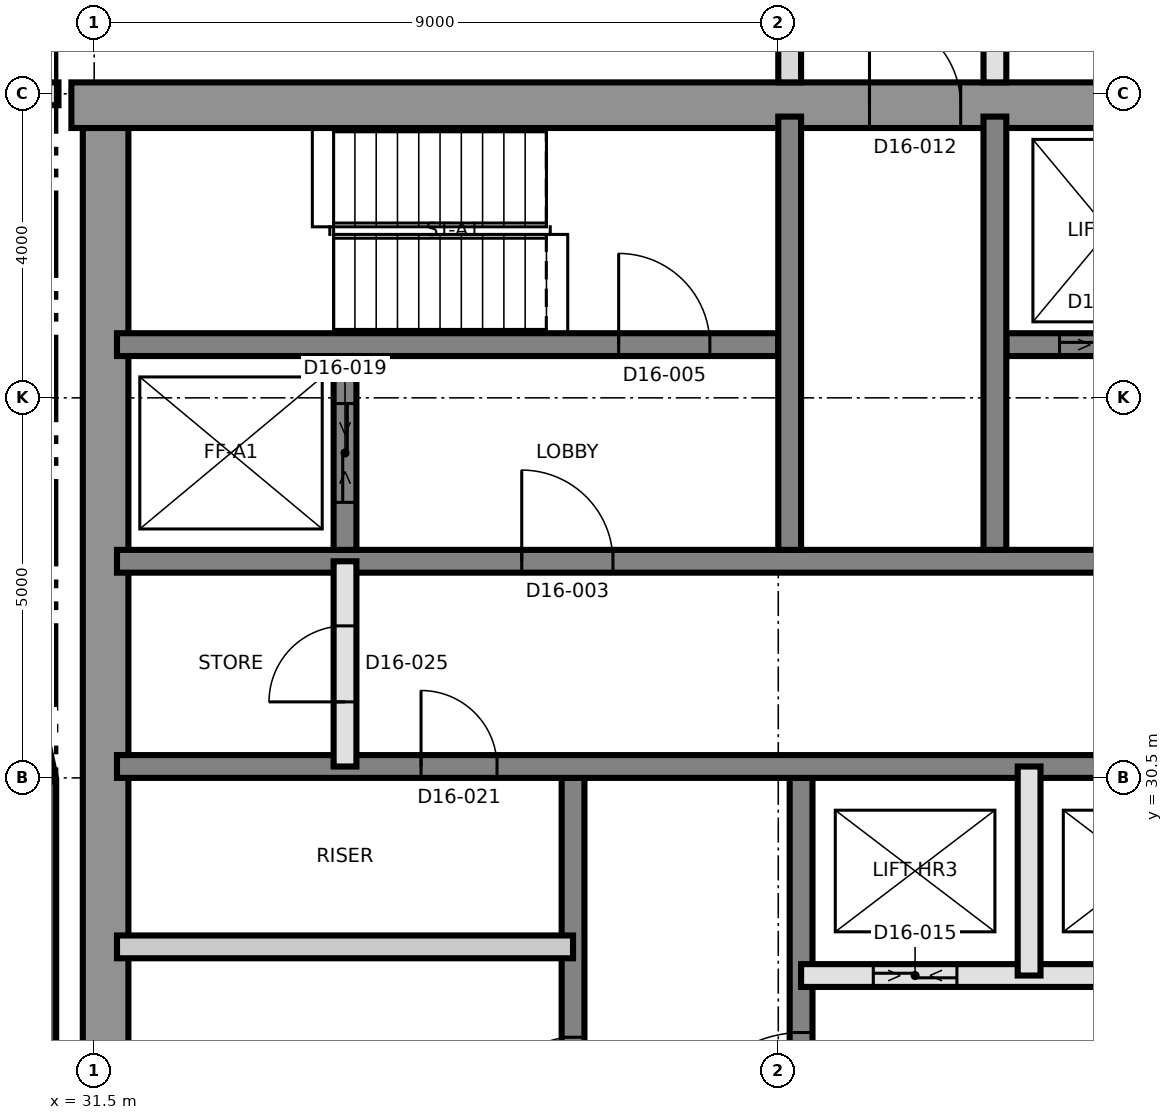
"""IFC4 building model, lengths in metres.
Left out: names, types, materials, properties, quantities, classifications, styles, units other than length and angle.
Written with IfcOpenShell. Run it as: python <this file> out.ifc"""

import sys

from ifc_helpers import new_model, si_unit, direction, frame, frame_2d, origin, place, context, subcontext, project, spatial, rectangle, extrude, element, fill, save


model = new_model("IFC4")
c1 = context("Model", 3, precision=1e-05, world=origin(), true_north=direction((0.0, 1.0)))
c2 = subcontext(c1, "Body", "Model", "MODEL_VIEW")
j1 = project(units=[si_unit("LENGTHUNIT", "METRE"), si_unit("PLANEANGLEUNIT", "RADIAN")], contexts=[c1])
p1 = place(None, origin())
s1 = spatial("IfcSite", under=j1, at=p1, CompositionType="ELEMENT")
p2 = place(p1, origin())
s2 = spatial("IfcBuilding", under=s1, at=p2, CompositionType="ELEMENT")
p3 = place(p2, frame((0.0, 0.0, 160.7)))
s3 = spatial("IfcBuildingStorey", under=s2, at=p3, CompositionType="ELEMENT", Elevation=160.7)
p4 = place(p3, frame((31.65, 21.8, 0.0), z_axis=(0.0, 0.0, 1.0), x_axis=(0.0, 1.0, 0.0)))
e1 = element("IfcWall", 1, at=p4, inside=s3, PredefinedType="SHEAR", context=c2, shape_type="SweptSolid", body=[
    extrude(rectangle(XDim=17.4, YDim=0.6, at=frame_2d((8.7, 0.0))), origin(), (0.0, 0.0, 1.0), 3.7),
])
p5 = place(p3, frame((31.2, 39.35, 0.0), z_axis=(0.0, 0.0, 1.0), x_axis=(1.0, 0.0, 0.0)))
e2 = element("IfcWall", 2, at=p5, inside=s3, PredefinedType="SHEAR", context=c2, shape_type="SweptSolid", body=[
    extrude(rectangle(XDim=27.0, YDim=0.6, at=frame_2d((13.5, 0.0))), origin(), (0.0, 0.0, 1.0), 3.7),
])
p6 = place(p5, frame((10.5, 0.0, 0.0)))
e3 = element("IfcOpeningElement", 3, at=p6, cuts=e2, PredefinedType="OPENING", context=c2, shape_type="SweptSolid", body=[
    extrude(rectangle(XDim=1.2, YDim=2.1, at=frame_2d((0.6, 1.05))), frame((0.0, 0.31, 0.0), z_axis=(0.0, -1.0, 0.0), x_axis=(1.0, 0.0, 0.0)), (0.0, 0.0, 1.0), 0.62),
])
p7 = place(p3, frame((37.8, 21.8, 0.0), z_axis=(0.0, 0.0, 1.0), x_axis=(0.0, 1.0, 0.0)))
e4 = element("IfcWall", 4, at=p7, inside=s3, PredefinedType="SHEAR", context=c2, shape_type="SweptSolid", body=[
    extrude(rectangle(XDim=8.7, YDim=0.3, at=frame_2d((4.35, 0.0))), origin(), (0.0, 0.0, 1.0), 3.7),
])
p8 = place(p7, frame((4.288, 0.0, 0.0)))
e5 = element("IfcOpeningElement", 5, at=p8, cuts=e4, PredefinedType="OPENING", context=c2, shape_type="SweptSolid", body=[
    extrude(rectangle(XDim=1.0, YDim=2.1, at=frame_2d((0.5, 1.05))), frame((0.0, 0.16, 0.0), z_axis=(0.0, -1.0, 0.0), x_axis=(1.0, 0.0, 0.0)), (0.0, 0.0, 1.0), 0.32),
])
p9 = place(p3, frame((40.8, 21.8, 0.0), z_axis=(0.0, 0.0, 1.0), x_axis=(0.0, 1.0, 0.0)))
e6 = element("IfcWall", 6, at=p9, inside=s3, PredefinedType="SHEAR", context=c2, shape_type="SweptSolid", body=[
    extrude(rectangle(XDim=8.7, YDim=0.3, at=frame_2d((4.35, 0.0))), origin(), (0.0, 0.0, 1.0), 3.7),
])
p10 = place(p9, frame((3.85, 0.0, 0.0)))
e7 = element("IfcOpeningElement", 7, at=p10, cuts=e6, PredefinedType="OPENING", context=c2, shape_type="SweptSolid", body=[
    extrude(rectangle(XDim=1.5, YDim=2.1, at=frame_2d((0.75, 1.05))), frame((0.0, 0.16, 0.0), z_axis=(0.0, -1.0, 0.0), x_axis=(1.0, 0.0, 0.0)), (0.0, 0.0, 1.0), 0.32),
])
p11 = place(p3, frame((31.8, 30.65, 0.0), z_axis=(0.0, 0.0, 1.0), x_axis=(1.0, 0.0, 0.0)))
e8 = element("IfcWall", 8, at=p11, inside=s3, PredefinedType="SHEAR", context=c2, shape_type="SweptSolid", body=[
    extrude(rectangle(XDim=26.4, YDim=0.3, at=frame_2d((13.2, 0.0))), origin(), (0.0, 0.0, 1.0), 3.7),
])
p12 = place(p11, frame((24.7, 0.0, 0.0)))
e9 = element("IfcOpeningElement", 9, at=p12, cuts=e8, PredefinedType="OPENING", context=c2, shape_type="SweptSolid", body=[
    extrude(rectangle(XDim=1.0, YDim=2.1, at=frame_2d((0.5, 1.05))), frame((0.0, 0.16, 0.0), z_axis=(0.0, -1.0, 0.0), x_axis=(1.0, 0.0, 0.0)), (0.0, 0.0, 1.0), 0.32),
])
p13 = place(p11, frame((4.0, 0.0, 0.0)))
e10 = element("IfcOpeningElement", 10, at=p13, cuts=e8, PredefinedType="OPENING", context=c2, shape_type="SweptSolid", body=[
    extrude(rectangle(XDim=1.0, YDim=2.1, at=frame_2d((0.5, 1.05))), frame((0.0, 0.16, 0.0), z_axis=(0.0, -1.0, 0.0), x_axis=(1.0, 0.0, 0.0)), (0.0, 0.0, 1.0), 0.32),
])
p14 = place(p3, frame((31.8, 33.35, 0.0), z_axis=(0.0, 0.0, 1.0), x_axis=(1.0, 0.0, 0.0)))
e11 = element("IfcWall", 11, at=p14, inside=s3, PredefinedType="SHEAR", context=c2, shape_type="SweptSolid", body=[
    extrude(rectangle(XDim=26.4, YDim=0.3, at=frame_2d((13.2, 0.0))), origin(), (0.0, 0.0, 1.0), 3.7),
])
p15 = place(p14, frame((13.85, 0.0, 0.0)))
e12 = element("IfcOpeningElement", 12, at=p15, cuts=e11, PredefinedType="OPENING", context=c2, shape_type="SweptSolid", body=[
    extrude(rectangle(XDim=1.4, YDim=2.1, at=frame_2d((0.7, 1.05))), frame((0.0, 0.16, 0.0), z_axis=(0.0, -1.0, 0.0), x_axis=(1.0, 0.0, 0.0)), (0.0, 0.0, 1.0), 0.32),
])
p16 = place(p14, frame((5.325, 0.0, 0.0)))
e13 = element("IfcOpeningElement", 13, at=p16, cuts=e11, PredefinedType="OPENING", context=c2, shape_type="SweptSolid", body=[
    extrude(rectangle(XDim=1.2, YDim=2.1, at=frame_2d((0.6, 1.05))), frame((0.0, 0.16, 0.0), z_axis=(0.0, -1.0, 0.0), x_axis=(1.0, 0.0, 0.0)), (0.0, 0.0, 1.0), 0.32),
])
p17 = place(p14, frame((19.875, 0.0, 0.0)))
e14 = element("IfcOpeningElement", 14, at=p17, cuts=e11, PredefinedType="OPENING", context=c2, shape_type="SweptSolid", body=[
    extrude(rectangle(XDim=1.2, YDim=2.1, at=frame_2d((0.6, 1.05))), frame((0.0, 0.16, 0.0), z_axis=(0.0, -1.0, 0.0), x_axis=(1.0, 0.0, 0.0)), (0.0, 0.0, 1.0), 0.32),
])
p18 = place(p3, frame((31.8, 36.2, 0.0), z_axis=(0.0, 0.0, 1.0), x_axis=(1.0, 0.0, 0.0)))
e15 = element("IfcWall", 15, at=p18, inside=s3, PredefinedType="SHEAR", context=c2, shape_type="SweptSolid", body=[
    extrude(rectangle(XDim=8.7, YDim=0.3, at=frame_2d((4.35, 0.0))), origin(), (0.0, 0.0, 1.0), 3.7),
])
p19 = place(p18, frame((6.6, 0.0, 0.0)))
e16 = element("IfcOpeningElement", 16, at=p19, cuts=e15, PredefinedType="OPENING", context=c2, shape_type="SweptSolid", body=[
    extrude(rectangle(XDim=1.2, YDim=2.1, at=frame_2d((0.6, 1.05))), frame((0.0, 0.16, 0.0), z_axis=(0.0, -1.0, 0.0), x_axis=(1.0, 0.0, 0.0)), (0.0, 0.0, 1.0), 0.32),
])
p20 = place(p3, frame((43.5, 36.2, 0.0), z_axis=(0.0, 0.0, 1.0), x_axis=(1.0, 0.0, 0.0)))
e17 = element("IfcWall", 17, at=p20, inside=s3, PredefinedType="SHEAR", context=c2, shape_type="SweptSolid", body=[
    extrude(rectangle(XDim=14.7, YDim=0.3, at=frame_2d((7.35, 0.0))), origin(), (0.0, 0.0, 1.0), 3.7),
])
p21 = place(p20, frame((6.9, 0.0, 0.0)))
e18 = element("IfcOpeningElement", 18, at=p21, cuts=e17, PredefinedType="OPENING", context=c2, shape_type="SweptSolid", body=[
    extrude(rectangle(XDim=1.2, YDim=2.1, at=frame_2d((0.6, 1.05))), frame((0.0, 0.16, 0.0), z_axis=(0.0, -1.0, 0.0), x_axis=(1.0, 0.0, 0.0)), (0.0, 0.0, 1.0), 0.32),
])
p22 = place(p20, frame((0.7, 0.0, 0.0)))
e19 = element("IfcOpeningElement", 19, at=p22, cuts=e17, PredefinedType="OPENING", context=c2, shape_type="SweptSolid", body=[
    extrude(rectangle(XDim=1.3, YDim=2.4, at=frame_2d((0.65, 1.2))), frame((0.0, 0.16, 0.0), z_axis=(0.0, -1.0, 0.0), x_axis=(1.0, 0.0, 0.0)), (0.0, 0.0, 1.0), 0.32),
])
p23 = place(p20, frame((3.7, 0.0, 0.0)))
e20 = element("IfcOpeningElement", 20, at=p23, cuts=e17, PredefinedType="OPENING", context=c2, shape_type="SweptSolid", body=[
    extrude(rectangle(XDim=1.3, YDim=2.4, at=frame_2d((0.65, 1.2))), frame((0.0, 0.16, 0.0), z_axis=(0.0, -1.0, 0.0), x_axis=(1.0, 0.0, 0.0)), (0.0, 0.0, 1.0), 0.32),
])
for number, where, z_axis, x_axis in (
    (21, (40.65, 33.5, 0.0), (0.0, 0.0, 1.0), (0.0, 1.0, 0.0)),
    (22, (43.35, 33.5, 0.0), (0.0, 0.0, 1.0), (0.0, 1.0, 0.0)),
):
    element("IfcWall", number, at=place(p3, frame(where, z_axis=z_axis, x_axis=x_axis)), inside=s3, PredefinedType="SHEAR", context=c2, shape_type="SweptSolid", body=[
        extrude(rectangle(XDim=5.7, YDim=0.3, at=frame_2d((2.85, 0.0))), origin(), (0.0, 0.0, 1.0), 3.7),
    ])
p24 = place(p3, frame((34.8, 33.5, 0.0), z_axis=(0.0, 0.0, 1.0), x_axis=(0.0, 1.0, 0.0)))
e23 = element("IfcWall", 23, at=p24, inside=s3, PredefinedType="SHEAR", context=c2, shape_type="SweptSolid", body=[
    extrude(rectangle(XDim=2.55, YDim=0.3, at=frame_2d((1.275, 0.0))), origin(), (0.0, 0.0, 1.0), 3.7),
])
p25 = place(p24, frame((0.625, 0.0, 0.0)))
e24 = element("IfcOpeningElement", 24, at=p25, cuts=e23, PredefinedType="OPENING", context=c2, shape_type="SweptSolid", body=[
    extrude(rectangle(XDim=1.3, YDim=2.4, at=frame_2d((0.65, 1.2))), frame((0.0, 0.16, 0.0), z_axis=(0.0, -1.0, 0.0), x_axis=(1.0, 0.0, 0.0)), (0.0, 0.0, 1.0), 0.32),
])
p26 = place(p3, frame((30.85, 30.454, 0.0), z_axis=(0.0, 0.0, 1.0), x_axis=(0.0, -1.0, 0.0)))
e25 = element("IfcWall", 25, at=p26, inside=s3, PredefinedType="SOLIDWALL", context=c2, shape_type="SweptSolid", body=[
    extrude(rectangle(XDim=9.094, YDim=0.3, at=frame_2d((4.547, 0.0))), origin(), (0.0, 0.0, 1.0), 3.4),
])
p27 = place(p3, frame((30.506, 32.049, 0.0), z_axis=(0.0, 0.0, 1.0), x_axis=(0.212695686462, -0.977118490747, 0.0)))
e26 = element("IfcWall", 26, at=p27, inside=s3, PredefinedType="SOLIDWALL", context=c2, shape_type="SweptSolid", body=[
    extrude(rectangle(XDim=1.6, YDim=0.3, at=frame_2d((0.8, 0.0))), origin(), (0.0, 0.0, 1.0), 3.4),
])
p28 = place(p3, frame((40.8, 27.9, 0.0), z_axis=(0.0, 0.0, 1.0), x_axis=(1.0, 0.0, 0.0)))
e27 = element("IfcWall", 27, at=p28, inside=s3, PredefinedType="SOLIDWALL", context=c2, shape_type="SweptSolid", body=[
    extrude(rectangle(XDim=6.0, YDim=0.3, at=frame_2d((3.0, 0.0))), origin(), (0.0, 0.0, 1.0), 3.4),
])
p29 = place(p28, frame((0.95, 0.0, 0.0)))
e28 = element("IfcOpeningElement", 28, at=p29, cuts=e27, PredefinedType="OPENING", context=c2, shape_type="SweptSolid", body=[
    extrude(rectangle(XDim=1.1, YDim=2.4, at=frame_2d((0.55, 1.2))), frame((0.0, 0.16, 0.0), z_axis=(0.0, -1.0, 0.0), x_axis=(1.0, 0.0, 0.0)), (0.0, 0.0, 1.0), 0.32),
])
p30 = place(p28, frame((3.95, 0.0, 0.0)))
e29 = element("IfcOpeningElement", 29, at=p30, cuts=e27, PredefinedType="OPENING", context=c2, shape_type="SweptSolid", body=[
    extrude(rectangle(XDim=1.1, YDim=2.4, at=frame_2d((0.55, 1.2))), frame((0.0, 0.16, 0.0), z_axis=(0.0, -1.0, 0.0), x_axis=(1.0, 0.0, 0.0)), (0.0, 0.0, 1.0), 0.32),
])
p31 = place(p3, frame((31.8, 28.277, 0.0), z_axis=(0.0, 0.0, 1.0), x_axis=(1.0, 0.0, 0.0)))
e30 = element("IfcWall", 30, at=p31, inside=s3, PredefinedType="PARTITIONING", context=c2, shape_type="SweptSolid", body=[
    extrude(rectangle(XDim=6.0, YDim=0.3, at=frame_2d((3.0, 0.0))), origin(), (0.0, 0.0, 1.0), 3.4),
])
p32 = place(p3, frame((34.8, 30.65, 0.0), z_axis=(0.0, 0.0, 1.0), x_axis=(0.0, 1.0, 0.0)))
e31 = element("IfcWall", 31, at=p32, inside=s3, PredefinedType="SOLIDWALL", context=c2, shape_type="SweptSolid", body=[
    extrude(rectangle(XDim=2.7, YDim=0.3, at=frame_2d((1.35, 0.0))), origin(), (0.0, 0.0, 1.0), 3.4),
])
p33 = place(p32, frame((0.85, 0.0, 0.0)))
e32 = element("IfcOpeningElement", 32, at=p33, cuts=e31, PredefinedType="OPENING", context=c2, shape_type="SweptSolid", body=[
    extrude(rectangle(XDim=1.0, YDim=2.1, at=frame_2d((0.5, 1.05))), frame((0.0, 0.16, 0.0), z_axis=(0.0, -1.0, 0.0), x_axis=(1.0, 0.0, 0.0)), (0.0, 0.0, 1.0), 0.32),
])
p34 = place(p3, frame((43.8, 27.9, 0.0), z_axis=(0.0, 0.0, 1.0), x_axis=(0.0, 1.0, 0.0)))
e33 = element("IfcWall", 33, at=p34, inside=s3, PredefinedType="SOLIDWALL", context=c2, shape_type="SweptSolid", body=[
    extrude(rectangle(XDim=2.75, YDim=0.3, at=frame_2d((1.375, 0.0))), origin(), (0.0, 0.0, 1.0), 3.4),
])
p35 = place(p3, frame((30.565, 39.5, 0.0), z_axis=(0.0, 0.0, 1.0), x_axis=(1.0, 0.0, 0.0)))
e34 = element("IfcWall", 34, at=p35, inside=s3, PredefinedType="PARTITIONING", context=c2, shape_type="SweptSolid", body=[
    extrude(rectangle(XDim=0.465, YDim=0.3, at=frame_2d((0.232, 0.0))), origin(), (0.0, 0.0, 1.0), 3.4),
])
p36 = place(p3, frame((40.65, 39.65, 0.0), z_axis=(0.0, 0.0, 1.0), x_axis=(0.0, 1.0, 0.0)))
e35 = element("IfcWall", 35, at=p36, inside=s3, PredefinedType="PARTITIONING", context=c2, shape_type="SweptSolid", body=[
    extrude(rectangle(XDim=37.025, YDim=0.3, at=frame_2d((18.513, 0.0))), origin(), (0.0, 0.0, 1.0), 3.4),
])
p37 = place(p36, frame((1.0, 0.0, 0.0)))
e36 = element("IfcOpeningElement", 36, at=p37, cuts=e35, PredefinedType="OPENING", context=c2, shape_type="SweptSolid", body=[
    extrude(rectangle(XDim=1.0, YDim=2.1, at=frame_2d((0.5, 1.05))), frame((0.0, 0.16, 0.0), z_axis=(0.0, -1.0, 0.0), x_axis=(1.0, 0.0, 0.0)), (0.0, 0.0, 1.0), 0.32),
])
p38 = place(p36, frame((6.85, 0.0, 0.0)))
e37 = element("IfcOpeningElement", 37, at=p38, cuts=e35, PredefinedType="OPENING", context=c2, shape_type="SweptSolid", body=[
    extrude(rectangle(XDim=1.0, YDim=2.1, at=frame_2d((0.5, 1.05))), frame((0.0, 0.16, 0.0), z_axis=(0.0, -1.0, 0.0), x_axis=(1.0, 0.0, 0.0)), (0.0, 0.0, 1.0), 0.32),
])
p39 = place(p36, frame((14.5, 0.0, 0.0)))
e38 = element("IfcOpeningElement", 38, at=p39, cuts=e35, PredefinedType="OPENING", context=c2, shape_type="SweptSolid", body=[
    extrude(rectangle(XDim=1.0, YDim=2.4, at=frame_2d((0.5, 1.2))), frame((0.0, 0.16, 0.0), z_axis=(0.0, -1.0, 0.0), x_axis=(1.0, 0.0, 0.0)), (0.0, 0.0, 1.0), 0.32),
])
p40 = place(p36, frame((21.35, 0.0, 0.0)))
e39 = element("IfcOpeningElement", 39, at=p40, cuts=e35, PredefinedType="OPENING", context=c2, shape_type="SweptSolid", body=[
    extrude(rectangle(XDim=1.0, YDim=2.4, at=frame_2d((0.5, 1.2))), frame((0.0, 0.16, 0.0), z_axis=(0.0, -1.0, 0.0), x_axis=(1.0, 0.0, 0.0)), (0.0, 0.0, 1.0), 0.32),
])
p41 = place(p3, frame((43.35, 39.65, 0.0), z_axis=(0.0, 0.0, 1.0), x_axis=(0.0, 1.0, 0.0)))
e40 = element("IfcWall", 40, at=p41, inside=s3, PredefinedType="SOLIDWALL", context=c2, shape_type="SweptSolid", body=[
    extrude(rectangle(XDim=26.1, YDim=0.3, at=frame_2d((13.05, 0.0))), origin(), (0.0, 0.0, 1.0), 3.4),
])
p42 = place(p41, frame((0.985, 0.0, 0.0)))
e41 = element("IfcOpeningElement", 41, at=p42, cuts=e40, PredefinedType="OPENING", context=c2, shape_type="SweptSolid", body=[
    extrude(rectangle(XDim=1.2, YDim=2.1, at=frame_2d((0.6, 1.05))), frame((0.0, 0.16, 0.0), z_axis=(0.0, -1.0, 0.0), x_axis=(1.0, 0.0, 0.0)), (0.0, 0.0, 1.0), 0.32),
])
p43 = place(p41, frame((4.235, 0.0, 0.0)))
e42 = element("IfcOpeningElement", 42, at=p43, cuts=e40, PredefinedType="OPENING", context=c2, shape_type="SweptSolid", body=[
    extrude(rectangle(XDim=1.0, YDim=2.1, at=frame_2d((0.5, 1.05))), frame((0.0, 0.16, 0.0), z_axis=(0.0, -1.0, 0.0), x_axis=(1.0, 0.0, 0.0)), (0.0, 0.0, 1.0), 0.32),
])
p44 = place(p41, frame((9.7, 0.0, 0.0)))
e43 = element("IfcOpeningElement", 43, at=p44, cuts=e40, PredefinedType="OPENING", context=c2, shape_type="SweptSolid", body=[
    extrude(rectangle(XDim=1.0, YDim=2.1, at=frame_2d((0.5, 1.05))), frame((0.0, 0.16, 0.0), z_axis=(0.0, -1.0, 0.0), x_axis=(1.0, 0.0, 0.0)), (0.0, 0.0, 1.0), 0.32),
])
p45 = place(p41, frame((15.55, 0.0, 0.0)))
e44 = element("IfcOpeningElement", 44, at=p45, cuts=e40, PredefinedType="OPENING", context=c2, shape_type="SweptSolid", body=[
    extrude(rectangle(XDim=1.0, YDim=2.1, at=frame_2d((0.5, 1.05))), frame((0.0, 0.16, 0.0), z_axis=(0.0, -1.0, 0.0), x_axis=(1.0, 0.0, 0.0)), (0.0, 0.0, 1.0), 0.32),
])
p46 = place(p41, frame((19.85, 0.0, 0.0)))
e45 = element("IfcOpeningElement", 45, at=p46, cuts=e40, PredefinedType="OPENING", context=c2, shape_type="SweptSolid", body=[
    extrude(rectangle(XDim=1.0, YDim=2.4, at=frame_2d((0.5, 1.2))), frame((0.0, 0.16, 0.0), z_axis=(0.0, -1.0, 0.0), x_axis=(1.0, 0.0, 0.0)), (0.0, 0.0, 1.0), 0.32),
])
p47 = place(p10, origin())
e46 = element("IfcDoor", 46, at=p47, inside=s3, OperationType="SINGLE_SWING_RIGHT", PredefinedType="DOOR", context=c2, shape_type="SweptSolid", body=[
    extrude(rectangle(XDim=1.5, YDim=2.1, at=frame_2d((0.75, 1.05))), frame((0.0, 0.025, 0.0), z_axis=(0.0, -1.0, 0.0), x_axis=(1.0, 0.0, 0.0)), (0.0, 0.0, 1.0), 0.05),
])
fill(e7, e46)
p48 = place(p16, origin())
e47 = element("IfcDoor", 47, at=p48, inside=s3, OperationType="SINGLE_SWING_LEFT", PredefinedType="DOOR", context=c2, shape_type="SweptSolid", body=[
    extrude(rectangle(XDim=1.2, YDim=2.1, at=frame_2d((0.6, 1.05))), frame((0.0, 0.025, 0.0), z_axis=(0.0, -1.0, 0.0), x_axis=(1.0, 0.0, 0.0)), (0.0, 0.0, 1.0), 0.05),
])
fill(e13, e47)
p49 = place(p19, origin())
e48 = element("IfcDoor", 48, at=p49, inside=s3, OperationType="SINGLE_SWING_RIGHT", PredefinedType="DOOR", context=c2, shape_type="SweptSolid", body=[
    extrude(rectangle(XDim=1.2, YDim=2.1, at=frame_2d((0.6, 1.05))), frame((0.0, 0.025, 0.0), z_axis=(0.0, -1.0, 0.0), x_axis=(1.0, 0.0, 0.0)), (0.0, 0.0, 1.0), 0.05),
])
fill(e16, e48)
p50 = place(p6, origin())
e49 = element("IfcDoor", 49, at=p50, inside=s3, OperationType="SINGLE_SWING_RIGHT", PredefinedType="DOOR", context=c2, shape_type="SweptSolid", body=[
    extrude(rectangle(XDim=1.2, YDim=2.1, at=frame_2d((0.6, 1.05))), frame((0.0, 0.025, 0.0), z_axis=(0.0, -1.0, 0.0), x_axis=(1.0, 0.0, 0.0)), (0.0, 0.0, 1.0), 0.05),
])
fill(e3, e49)
p51 = place(p29, origin())
e50 = element("IfcDoor", 50, at=p51, inside=s3, OperationType="SLIDING_TO_LEFT", PredefinedType="DOOR", context=c2, shape_type="SweptSolid", body=[
    extrude(rectangle(XDim=1.1, YDim=2.4, at=frame_2d((0.55, 1.2))), frame((0.0, 0.025, 0.0), z_axis=(0.0, -1.0, 0.0), x_axis=(1.0, 0.0, 0.0)), (0.0, 0.0, 1.0), 0.05),
])
fill(e28, e50)
p52 = place(p22, origin())
e51 = element("IfcDoor", 51, at=p52, inside=s3, OperationType="SLIDING_TO_LEFT", PredefinedType="DOOR", context=c2, shape_type="SweptSolid", body=[
    extrude(rectangle(XDim=1.3, YDim=2.4, at=frame_2d((0.65, 1.2))), frame((0.0, 0.025, 0.0), z_axis=(0.0, -1.0, 0.0), x_axis=(1.0, 0.0, 0.0)), (0.0, 0.0, 1.0), 0.05),
])
fill(e19, e51)
p53 = place(p25, origin())
e52 = element("IfcDoor", 52, at=p53, inside=s3, OperationType="SLIDING_TO_LEFT", PredefinedType="DOOR", context=c2, shape_type="SweptSolid", body=[
    extrude(rectangle(XDim=1.3, YDim=2.4, at=frame_2d((0.65, 1.2))), frame((0.0, 0.025, 0.0), z_axis=(0.0, -1.0, 0.0), x_axis=(1.0, 0.0, 0.0)), (0.0, 0.0, 1.0), 0.05),
])
fill(e24, e52)
p54 = place(p13, origin())
e53 = element("IfcDoor", 53, at=p54, inside=s3, OperationType="SINGLE_SWING_LEFT", PredefinedType="DOOR", context=c2, shape_type="SweptSolid", body=[
    extrude(rectangle(XDim=1.0, YDim=2.1, at=frame_2d((0.5, 1.05))), frame((0.0, 0.025, 0.0), z_axis=(0.0, -1.0, 0.0), x_axis=(1.0, 0.0, 0.0)), (0.0, 0.0, 1.0), 0.05),
])
fill(e10, e53)
p55 = place(p8, origin())
e54 = element("IfcDoor", 54, at=p55, inside=s3, OperationType="SINGLE_SWING_RIGHT", PredefinedType="DOOR", context=c2, shape_type="SweptSolid", body=[
    extrude(rectangle(XDim=1.0, YDim=2.1, at=frame_2d((0.5, 1.05))), frame((0.0, 0.025, 0.0), z_axis=(0.0, -1.0, 0.0), x_axis=(1.0, 0.0, 0.0)), (0.0, 0.0, 1.0), 0.05),
])
fill(e5, e54)
p56 = place(p33, origin())
e55 = element("IfcDoor", 55, at=p56, inside=s3, OperationType="SINGLE_SWING_LEFT", PredefinedType="DOOR", context=c2, shape_type="SweptSolid", body=[
    extrude(rectangle(XDim=1.0, YDim=2.1, at=frame_2d((0.5, 1.05))), frame((0.0, 0.025, 0.0), z_axis=(0.0, -1.0, 0.0), x_axis=(1.0, 0.0, 0.0)), (0.0, 0.0, 1.0), 0.05),
])
fill(e32, e55)
save(model, sys.argv[1])
